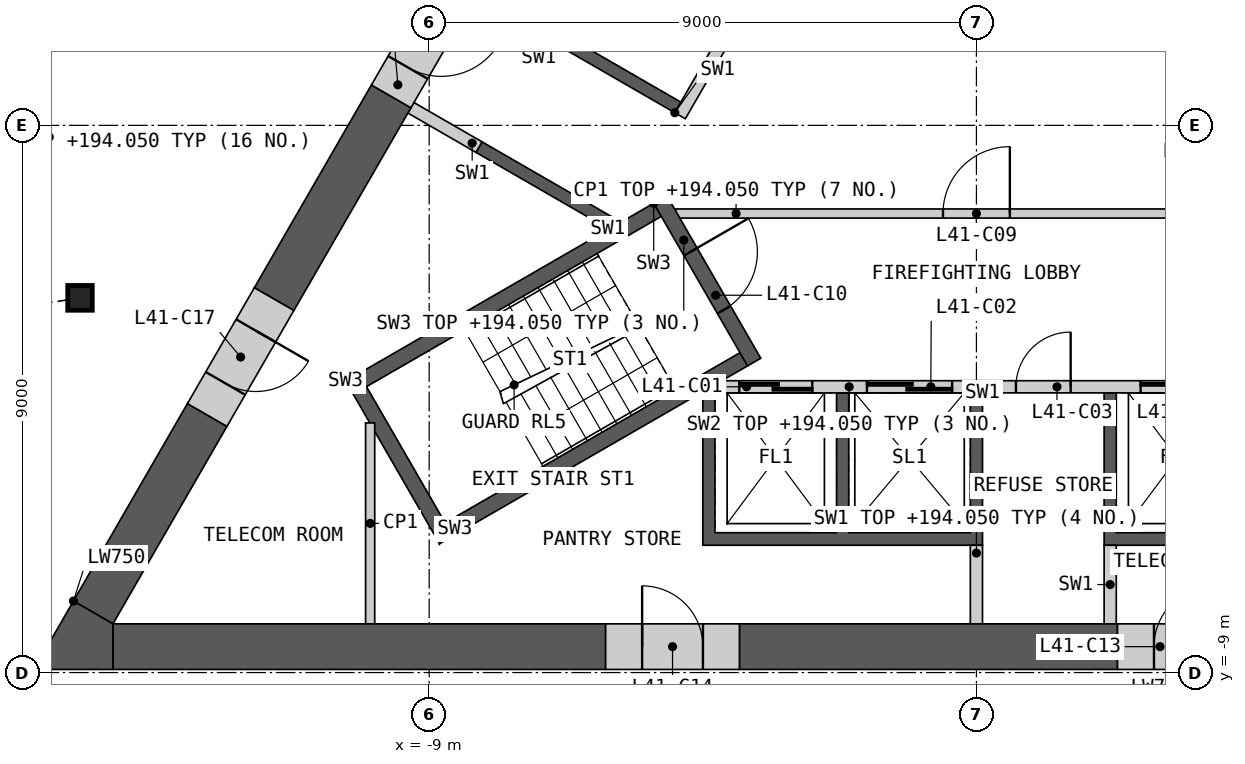
"""IFC4 building model, lengths in metres.
Left out: names, types, materials, properties, quantities, classifications, styles, units other than length and angle.
Written with IfcOpenShell. Run it as: python <this file> out.ifc"""

import sys

from ifc_helpers import new_model, si_unit, direction, frame, frame_2d, origin, origin_2d, place, context, subcontext, project, spatial, polyline, rectangle, i_section, outline, extrude, element, fill, save


model = new_model("IFC4")
c1 = context("Model", 3, precision=1e-05, world=origin(), true_north=direction((0.0, 1.0)))
c2 = subcontext(c1, "Body", "Model", "MODEL_VIEW")
j1 = project(units=[si_unit("LENGTHUNIT", "METRE"), si_unit("PLANEANGLEUNIT", "RADIAN")], contexts=[c1])
p1 = place(None, origin())
s1 = spatial("IfcSite", under=j1, at=p1, CompositionType="ELEMENT")
p2 = place(p1, origin())
s2 = spatial("IfcBuilding", under=s1, at=p2, CompositionType="ELEMENT")
p3 = place(p2, frame((0.0, 0.0, 190.8)))
s3 = spatial("IfcBuildingStorey", under=s2, at=p3, CompositionType="ELEMENT", Elevation=190.8)
p4 = place(p3, frame((-14.743, -2.837, 0.0), z_axis=(0.0, 0.0, 1.0), x_axis=(1.0, 0.0, 0.0)))
e1 = element("IfcColumn", 1, at=p4, inside=s3, PredefinedType="COLUMN", context=c2, shape_type="SweptSolid", body=[
    extrude(i_section(OverallWidth=0.404, OverallDepth=0.407, WebThickness=0.027, FlangeThickness=0.044, at=origin_2d()), origin(), (0.0, 0.0, 1.0), 3.6),
])
p5 = place(p3, origin())
e2 = element("IfcWall", 2, at=p5, inside=s3, PredefinedType="SHEAR", context=c2, shape_type="SweptSolid", body=[
    extrude(outline(polyline([(4.5, -4.4), (4.5, -6.906), (2.1, -6.906), (2.1, -4.4), (2.3, -4.4), (2.3, -6.7), (4.3, -6.7), (4.3, -4.4), (4.5, -4.4)])), origin(), (0.0, 0.0, 1.0), 3.25),
])
p6 = place(p3, origin())
e3 = element("IfcWall", 3, at=p6, inside=s3, PredefinedType="SHEAR", context=c2, shape_type="SweptSolid", body=[
    extrude(outline(polyline([(0.1, -4.4), (0.1, -6.906), (-4.5, -6.906), (-4.5, -4.4), (-4.3, -4.4), (-4.3, -6.7), (-2.3, -6.7), (-2.3, -4.4), (-2.1, -4.4), (-2.1, -6.7), (-0.1, -6.7), (-0.1, -4.4), (0.1, -4.4)])), origin(), (0.0, 0.0, 1.0), 3.25),
])
p7 = place(p3, frame((-4.187, -4.3, 0.0), z_axis=(0.0, 0.0, 1.0), x_axis=(1.0, 0.0, 0.0)))
e4 = element("IfcWall", 4, at=p7, inside=s3, PredefinedType="SOLIDWALL", context=c2, shape_type="SweptSolid", body=[
    extrude(rectangle(XDim=8.373, YDim=0.2, at=frame_2d((4.187, 0.0))), origin(), (0.0, 0.0, 1.0), 3.25),
])
p8 = place(p7, frame((0.287, 0.0, 0.0)))
e5 = element("IfcOpeningElement", 5, at=p8, cuts=e4, PredefinedType="OPENING", context=c2, shape_type="SweptSolid", body=[
    extrude(rectangle(XDim=1.2, YDim=2.1, at=frame_2d((0.6, 1.05))), frame((0.0, 0.11, 0.0), z_axis=(0.0, -1.0, 0.0), x_axis=(1.0, 0.0, 0.0)), (0.0, 0.0, 1.0), 0.22),
])
p9 = place(p7, frame((2.387, 0.0, 0.0)))
e6 = element("IfcOpeningElement", 6, at=p9, cuts=e4, PredefinedType="OPENING", context=c2, shape_type="SweptSolid", body=[
    extrude(rectangle(XDim=1.4, YDim=2.1, at=frame_2d((0.7, 1.05))), frame((0.0, 0.11, 0.0), z_axis=(0.0, -1.0, 0.0), x_axis=(1.0, 0.0, 0.0)), (0.0, 0.0, 1.0), 0.22),
])
p10 = place(p7, frame((4.837, 0.0, 0.0)))
e7 = element("IfcOpeningElement", 7, at=p10, cuts=e4, PredefinedType="OPENING", context=c2, shape_type="SweptSolid", body=[
    extrude(rectangle(XDim=0.9, YDim=2.1, at=frame_2d((0.45, 1.05))), frame((0.0, 0.11, 0.0), z_axis=(0.0, -1.0, 0.0), x_axis=(1.0, 0.0, 0.0)), (0.0, 0.0, 1.0), 0.22),
])
p11 = place(p7, frame((6.887, 0.0, 0.0)))
e8 = element("IfcOpeningElement", 8, at=p11, cuts=e4, PredefinedType="OPENING", context=c2, shape_type="SweptSolid", body=[
    extrude(rectangle(XDim=1.2, YDim=2.1, at=frame_2d((0.6, 1.05))), frame((0.0, 0.11, 0.0), z_axis=(0.0, -1.0, 0.0), x_axis=(1.0, 0.0, 0.0)), (0.0, 0.0, 1.0), 0.22),
])
for number, where, z_axis, x_axis in (
    (9, (0.0, -6.906, 0.0), (0.0, 0.0, 1.0), (0.0, -1.0, 0.0)),
    (10, (2.2, -6.906, 0.0), (0.0, 0.0, 1.0), (0.0, -1.0, 0.0)),
):
    element("IfcWall", number, at=place(p3, frame(where, z_axis=z_axis, x_axis=x_axis)), inside=s3, PredefinedType="SHEAR", context=c2, shape_type="SweptSolid", body=[
        extrude(rectangle(XDim=1.293, YDim=0.2, at=frame_2d((0.646, 0.0))), origin(), (0.0, 0.0, 1.0), 3.25),
    ])
p12 = place(p3, origin())
e11 = element("IfcWall", 11, at=p12, inside=s3, PredefinedType="SHEAR", context=c2, shape_type="SweptSolid", body=[
    extrude(outline(polyline([(1.561, 6.097), (3.731, 7.35), (8.231, -0.444), (6.061, -1.697), (5.96, -1.524), (7.952, -0.374), (4.752, 5.169), (2.76, 4.019), (2.66, 4.192), (4.652, 5.342), (3.652, 7.074), (1.66, 5.924), (1.561, 6.097)])), origin(), (0.0, 0.0, 1.0), 3.25),
])
p13 = place(p3, frame((5.817, -1.476, 0.0), z_axis=(0.0, 0.0, 1.0), x_axis=(-0.500002616675, 0.866023893041, 0.0)))
e12 = element("IfcWall", 12, at=p13, inside=s3, PredefinedType="SOLIDWALL", context=c2, shape_type="SweptSolid", body=[
    extrude(rectangle(XDim=8.373, YDim=0.2, at=frame_2d((4.187, 0.0))), origin(), (0.0, 0.0, 1.0), 3.25),
])
p14 = place(p13, frame((2.637, 0.0, 0.0)))
e13 = element("IfcOpeningElement", 13, at=p14, cuts=e12, PredefinedType="OPENING", context=c2, shape_type="SweptSolid", body=[
    extrude(rectangle(XDim=0.9, YDim=2.1, at=frame_2d((0.45, 1.05))), frame((0.0, 0.11, 0.0), z_axis=(0.0, -1.0, 0.0), x_axis=(1.0, 0.0, 0.0)), (0.0, 0.0, 1.0), 0.22),
])
p15 = place(p13, frame((6.937, 0.0, 0.0)))
e14 = element("IfcOpeningElement", 14, at=p15, cuts=e12, PredefinedType="OPENING", context=c2, shape_type="SweptSolid", body=[
    extrude(rectangle(XDim=1.1, YDim=2.1, at=frame_2d((0.55, 1.05))), frame((0.0, 0.11, 0.0), z_axis=(0.0, -1.0, 0.0), x_axis=(1.0, 0.0, 0.0)), (0.0, 0.0, 1.0), 0.22),
])
p16 = place(p3, origin())
e15 = element("IfcWall", 15, at=p16, inside=s3, PredefinedType="SHEAR", context=c2, shape_type="SweptSolid", body=[
    extrude(outline(polyline([(-6.061, -1.697), (-8.231, -0.444), (-8.131, -0.271), (-5.96, -1.524), (-6.061, -1.697)])), origin(), (0.0, 0.0, 1.0), 3.25),
])
p17 = place(p3, origin())
e16 = element("IfcWall", 16, at=p17, inside=s3, PredefinedType="SHEAR", context=c2, shape_type="SweptSolid", body=[
    extrude(outline(polyline([(-4.96, 0.208), (-7.131, 1.461), (-3.731, 7.35), (-1.561, 6.097), (-1.66, 5.924), (-3.652, 7.074), (-4.652, 5.342), (-2.66, 4.192), (-2.76, 4.019), (-4.752, 5.169), (-5.752, 3.437), (-3.76, 2.287), (-3.861, 2.113), (-5.852, 3.263), (-6.852, 1.531), (-4.861, 0.381), (-4.96, 0.208)])), origin(), (0.0, 0.0, 1.0), 3.25),
])
p18 = place(p3, frame((-1.631, 5.776, 0.0), z_axis=(0.0, 0.0, 1.0), x_axis=(-0.499992876559, -0.866029516466, 0.0)))
e17 = element("IfcWall", 17, at=p18, inside=s3, PredefinedType="SOLIDWALL", context=c2, shape_type="SweptSolid", body=[
    extrude(rectangle(XDim=6.486, YDim=0.2, at=frame_2d((3.243, 0.0))), origin(), (0.0, 0.0, 1.0), 3.25),
])
p19 = place(p18, frame((0.337, 0.0, 0.0)))
e18 = element("IfcOpeningElement", 18, at=p19, cuts=e17, PredefinedType="OPENING", context=c2, shape_type="SweptSolid", body=[
    extrude(rectangle(XDim=1.1, YDim=2.1, at=frame_2d((0.55, 1.05))), frame((0.0, 0.11, 0.0), z_axis=(0.0, -1.0, 0.0), x_axis=(1.0, 0.0, 0.0)), (0.0, 0.0, 1.0), 0.22),
])
p20 = place(p18, frame((2.537, 0.0, 0.0)))
e19 = element("IfcOpeningElement", 19, at=p20, cuts=e17, PredefinedType="OPENING", context=c2, shape_type="SweptSolid", body=[
    extrude(rectangle(XDim=1.1, YDim=2.1, at=frame_2d((0.55, 1.05))), frame((0.0, 0.11, 0.0), z_axis=(0.0, -1.0, 0.0), x_axis=(1.0, 0.0, 0.0)), (0.0, 0.0, 1.0), 0.22),
])
p21 = place(p3, frame((-8.181, -0.357, 0.0), z_axis=(0.0, 0.0, 1.0), x_axis=(-0.866003189247, 0.500038474733, 0.0)))
e20 = element("IfcWall", 20, at=p21, inside=s3, PredefinedType="SHEAR", context=c2, shape_type="SweptSolid", body=[
    extrude(rectangle(XDim=1.293, YDim=0.2, at=frame_2d((0.646, 0.0))), origin(), (0.0, 0.0, 1.0), 3.25),
])
p22 = place(p3, frame((-4.941, -1.45, 0.0), z_axis=(0.0, 0.0, 1.0), x_axis=(1.0, 0.0, 0.0)))
e21 = element("IfcWall", 21, at=p22, inside=s3, PredefinedType="PARTITIONING", context=c2, shape_type="SweptSolid", body=[
    extrude(rectangle(XDim=9.882, YDim=0.15, at=frame_2d((4.941, 0.0))), origin(), (0.0, 0.0, 1.0), 3.25),
])
p23 = place(p22, frame((4.391, 0.0, 0.0)))
e22 = element("IfcOpeningElement", 22, at=p23, cuts=e21, PredefinedType="OPENING", context=c2, shape_type="SweptSolid", body=[
    extrude(rectangle(XDim=1.1, YDim=2.1, at=frame_2d((0.55, 1.05))), frame((0.0, 0.085, 0.0), z_axis=(0.0, -1.0, 0.0), x_axis=(1.0, 0.0, 0.0)), (0.0, 0.0, 1.0), 0.17),
])
p24 = place(p3, origin())
e23 = element("IfcWall", 23, at=p24, inside=s3, PredefinedType="SHEAR", context=c2, shape_type="SweptSolid", body=[
    extrude(outline(polyline([(-5.307, -1.281), (-10.374, -4.206), (-10.032, -4.298), (-5.182, -1.498), (-5.307, -1.281)])), origin(), (0.0, 0.0, 1.0), 3.25),
])
p25 = place(p3, origin())
e24 = element("IfcWall", 24, at=p25, inside=s3, PredefinedType="SHEAR", context=c2, shape_type="SweptSolid", body=[
    extrude(outline(polyline([(-10.374, -4.206), (-8.83, -6.881), (-8.738, -6.539), (-10.032, -4.298), (-10.374, -4.206)])), origin(), (0.0, 0.0, 1.0), 3.25),
])
p26 = place(p3, origin())
e25 = element("IfcWall", 25, at=p26, inside=s3, PredefinedType="SHEAR", context=c2, shape_type="SweptSolid", body=[
    extrude(outline(polyline([(-8.738, -6.539), (-8.83, -6.881), (-3.763, -3.956), (-3.888, -3.739), (-8.738, -6.539)])), origin(), (0.0, 0.0, 1.0), 3.25),
])
p27 = place(p3, frame((-5.199, -1.219, 0.0), z_axis=(0.0, 0.0, 1.0), x_axis=(0.499982516597, -0.866035497597, 0.0)))
e26 = element("IfcWall", 26, at=p27, inside=s3, PredefinedType="SHEAR", context=c2, shape_type="SweptSolid", body=[
    extrude(rectangle(XDim=3.088, YDim=0.25, at=frame_2d((1.544, 0.0))), origin(), (0.0, 0.0, 1.0), 3.25),
])
p28 = place(p27, frame((0.994, 0.0, 0.0)))
e27 = element("IfcOpeningElement", 27, at=p28, cuts=e26, PredefinedType="OPENING", context=c2, shape_type="SweptSolid", body=[
    extrude(rectangle(XDim=1.1, YDim=2.1, at=frame_2d((0.55, 1.05))), frame((0.0, 0.135, 0.0), z_axis=(0.0, -1.0, 0.0), x_axis=(1.0, 0.0, 0.0)), (0.0, 0.0, 1.0), 0.27),
])
p29 = place(p3, frame((-9.971, -8.199, 0.0), z_axis=(0.0, 0.0, 1.0), x_axis=(0.0, 1.0, 0.0)))
e28 = element("IfcWall", 28, at=p29, inside=s3, PredefinedType="PARTITIONING", context=c2, shape_type="SweptSolid", body=[
    extrude(rectangle(XDim=3.305, YDim=0.15, at=frame_2d((1.652, 0.0))), origin(), (0.0, 0.0, 1.0), 3.25),
])
p30 = place(p3, frame((-14.201, -8.574, 0.0), z_axis=(0.0, 0.0, 1.0), x_axis=(1.0, 0.0, 0.0)))
e29 = element("IfcWall", 29, at=p30, inside=s3, PredefinedType="SHEAR", context=c2, shape_type="SweptSolid", body=[
    extrude(rectangle(XDim=8.103, YDim=0.75, at=frame_2d((4.052, 0.0))), origin(), (0.0, 0.0, 1.0), 3.25),
])
p31 = place(p3, frame((-3.898, -8.574, 0.0), z_axis=(0.0, 0.0, 1.0), x_axis=(1.0, 0.0, 0.0)))
e30 = element("IfcWall", 30, at=p31, inside=s3, PredefinedType="SHEAR", context=c2, shape_type="SweptSolid", body=[
    extrude(rectangle(XDim=6.218, YDim=0.75, at=frame_2d((3.109, 0.0))), origin(), (0.0, 0.0, 1.0), 3.25),
])
p32 = place(p3, frame((-9.625, 0.477, 0.0), z_axis=(0.0, 0.0, 1.0), x_axis=(-0.499951145694, -0.866053607994, 0.0)))
e31 = element("IfcWall", 31, at=p32, inside=s3, PredefinedType="SHEAR", context=c2, shape_type="SweptSolid", body=[
    extrude(rectangle(XDim=3.851, YDim=0.75, at=frame_2d((1.925, 0.0))), origin(), (0.0, 0.0, 1.0), 3.25),
])
p33 = place(p3, frame((-12.65, -4.763, 0.0), z_axis=(0.0, 0.0, 1.0), x_axis=(-0.499996681051, -0.866027319972, 0.0)))
e32 = element("IfcWall", 32, at=p33, inside=s3, PredefinedType="SHEAR", context=c2, shape_type="SweptSolid", body=[
    extrude(rectangle(XDim=3.75, YDim=0.75, at=frame_2d((1.875, 0.0))), origin(), (0.0, 0.0, 1.0), 3.25),
])
p34 = place(p3, origin())
e33 = element("IfcWall", 33, at=p34, inside=s3, PredefinedType="SHEAR", context=c2, shape_type="SweptSolid", body=[
    extrude(outline(polyline([(-14.851, -7.824), (-14.201, -8.199), (-14.201, -8.949), (-15.5, -8.949), (-14.851, -7.824)])), origin(), (0.0, 0.0, 1.0), 3.25),
])
p35 = place(p3, frame((2.32, -8.574, 0.0), z_axis=(0.0, 0.0, 1.0), x_axis=(1.0, 0.0, 0.0)))
e34 = element("IfcWall", 34, at=p35, inside=s3, PredefinedType="SHEAR", context=c2, shape_type="SweptSolid", body=[
    extrude(rectangle(XDim=2.625, YDim=0.75, at=frame_2d((1.312, 0.0))), origin(), (0.0, 0.0, 1.0), 3.25),
])
p36 = place(p35, frame((0.6, 0.0, 0.0)))
e35 = element("IfcOpeningElement", 35, at=p36, cuts=e34, PredefinedType="OPENING", context=c2, shape_type="SweptSolid", body=[
    extrude(rectangle(XDim=1.0, YDim=2.1, at=frame_2d((0.5, 1.05))), frame((0.0, 0.385, 0.0), z_axis=(0.0, -1.0, 0.0), x_axis=(1.0, 0.0, 0.0)), (0.0, 0.0, 1.0), 0.77),
])
p37 = place(p3, frame((-6.098, -8.574, 0.0), z_axis=(0.0, 0.0, 1.0), x_axis=(1.0, 0.0, 0.0)))
e36 = element("IfcWall", 36, at=p37, inside=s3, PredefinedType="SHEAR", context=c2, shape_type="SweptSolid", body=[
    extrude(rectangle(XDim=2.2, YDim=0.75, at=frame_2d((1.1, 0.0))), origin(), (0.0, 0.0, 1.0), 3.25),
])
p38 = place(p37, frame((0.6, 0.0, 0.0)))
e37 = element("IfcOpeningElement", 37, at=p38, cuts=e36, PredefinedType="OPENING", context=c2, shape_type="SweptSolid", body=[
    extrude(rectangle(XDim=1.0, YDim=2.1, at=frame_2d((0.5, 1.05))), frame((0.0, 0.385, 0.0), z_axis=(0.0, -1.0, 0.0), x_axis=(1.0, 0.0, 0.0)), (0.0, 0.0, 1.0), 0.77),
])
p39 = place(p3, frame((-11.551, -2.858, 0.0), z_axis=(0.0, 0.0, 1.0), x_axis=(-0.499946605688, -0.86605622881, 0.0)))
e38 = element("IfcWall", 38, at=p39, inside=s3, PredefinedType="SHEAR", context=c2, shape_type="SweptSolid", body=[
    extrude(rectangle(XDim=2.2, YDim=0.75, at=frame_2d((1.1, 0.0))), origin(), (0.0, 0.0, 1.0), 3.25),
])
p40 = place(p39, frame((0.6, 0.0, 0.0)))
e39 = element("IfcOpeningElement", 39, at=p40, cuts=e38, PredefinedType="OPENING", context=c2, shape_type="SweptSolid", body=[
    extrude(rectangle(XDim=1.0, YDim=2.1, at=frame_2d((0.5, 1.05))), frame((0.0, 0.385, 0.0), z_axis=(0.0, -1.0, 0.0), x_axis=(1.0, 0.0, 0.0)), (0.0, 0.0, 1.0), 0.77),
])
p41 = place(p3, frame((-8.525, 2.382, 0.0), z_axis=(0.0, 0.0, 1.0), x_axis=(-0.500077893725, -0.86598042715, 0.0)))
e40 = element("IfcWall", 40, at=p41, inside=s3, PredefinedType="SHEAR", context=c2, shape_type="SweptSolid", body=[
    extrude(rectangle(XDim=2.2, YDim=0.75, at=frame_2d((1.1, 0.0))), origin(), (0.0, 0.0, 1.0), 3.25),
])
p42 = place(p41, frame((0.55, 0.0, 0.0)))
e41 = element("IfcOpeningElement", 41, at=p42, cuts=e40, PredefinedType="OPENING", context=c2, shape_type="SweptSolid", body=[
    extrude(rectangle(XDim=1.1, YDim=2.1, at=frame_2d((0.55, 1.05))), frame((0.0, 0.385, 0.0), z_axis=(0.0, -1.0, 0.0), x_axis=(1.0, 0.0, 0.0)), (0.0, 0.0, 1.0), 0.77),
])
p43 = place(p3, frame((-19.476, -5.035, 0.0), z_axis=(0.0, 0.0, 1.0), x_axis=(0.500000757641, 0.86602496636, 0.0)))
e42 = element("IfcWall", 42, at=p43, inside=s3, PredefinedType="PARTITIONING", context=c2, shape_type="SweptSolid", body=[
    extrude(rectangle(XDim=28.198, YDim=0.2, at=frame_2d((14.099, 0.0))), origin(), (0.0, 0.0, 1.0), 3.25),
])
p44 = place(p43, frame((25.796, 0.0, 0.0)))
e43 = element("IfcOpeningElement", 43, at=p44, cuts=e42, PredefinedType="OPENING", context=c2, shape_type="SweptSolid", body=[
    extrude(rectangle(XDim=0.95, YDim=2.1, at=frame_2d((0.475, 1.05))), frame((0.0, 0.11, 0.0), z_axis=(0.0, -1.0, 0.0), x_axis=(1.0, 0.0, 0.0)), (0.0, 0.0, 1.0), 0.22),
])
p45 = place(p43, frame((14.603, 0.0, 0.0)))
e44 = element("IfcOpeningElement", 44, at=p45, cuts=e42, PredefinedType="OPENING", context=c2, shape_type="SweptSolid", body=[
    extrude(rectangle(XDim=1.1, YDim=2.1, at=frame_2d((0.55, 1.05))), frame((0.0, 0.11, 0.0), z_axis=(0.0, -1.0, 0.0), x_axis=(1.0, 0.0, 0.0)), (0.0, 0.0, 1.0), 0.22),
])
p46 = place(p43, frame((11.993, 0.0, 0.0)))
e45 = element("IfcOpeningElement", 45, at=p46, cuts=e42, PredefinedType="OPENING", context=c2, shape_type="SweptSolid", body=[
    extrude(rectangle(XDim=1.1, YDim=2.1, at=frame_2d((0.55, 1.05))), frame((0.0, 0.11, 0.0), z_axis=(0.0, -1.0, 0.0), x_axis=(1.0, 0.0, 0.0)), (0.0, 0.0, 1.0), 0.22),
])
p47 = place(p43, frame((1.452, 0.0, 0.0)))
e46 = element("IfcOpeningElement", 46, at=p47, cuts=e42, PredefinedType="OPENING", context=c2, shape_type="SweptSolid", body=[
    extrude(rectangle(XDim=0.95, YDim=2.1, at=frame_2d((0.475, 1.05))), frame((0.0, 0.11, 0.0), z_axis=(0.0, -1.0, 0.0), x_axis=(1.0, 0.0, 0.0)), (0.0, 0.0, 1.0), 0.22),
])
p48 = place(p8, origin())
e47 = element("IfcDoor", 47, at=p48, inside=s3, OperationType="SLIDING_TO_LEFT", PredefinedType="DOOR", context=c2, shape_type="SweptSolid", body=[
    extrude(rectangle(XDim=1.2, YDim=2.1, at=frame_2d((0.6, 1.05))), frame((0.0, 0.025, 0.0), z_axis=(0.0, -1.0, 0.0), x_axis=(1.0, 0.0, 0.0)), (0.0, 0.0, 1.0), 0.05),
])
fill(e5, e47)
p49 = place(p9, origin())
e48 = element("IfcDoor", 48, at=p49, inside=s3, OperationType="SLIDING_TO_LEFT", PredefinedType="DOOR", context=c2, shape_type="SweptSolid", body=[
    extrude(rectangle(XDim=1.4, YDim=2.1, at=frame_2d((0.7, 1.05))), frame((0.0, 0.025, 0.0), z_axis=(0.0, -1.0, 0.0), x_axis=(1.0, 0.0, 0.0)), (0.0, 0.0, 1.0), 0.05),
])
fill(e6, e48)
p50 = place(p10, origin())
e49 = element("IfcDoor", 49, at=p50, inside=s3, OperationType="SINGLE_SWING_RIGHT", PredefinedType="DOOR", context=c2, shape_type="SweptSolid", body=[
    extrude(rectangle(XDim=0.9, YDim=2.1, at=frame_2d((0.45, 1.05))), frame((0.0, 0.025, 0.0), z_axis=(0.0, -1.0, 0.0), x_axis=(1.0, 0.0, 0.0)), (0.0, 0.0, 1.0), 0.05),
])
fill(e7, e49)
p51 = place(p11, origin())
e50 = element("IfcDoor", 50, at=p51, inside=s3, OperationType="SLIDING_TO_LEFT", PredefinedType="DOOR", context=c2, shape_type="SweptSolid", body=[
    extrude(rectangle(XDim=1.2, YDim=2.1, at=frame_2d((0.6, 1.05))), frame((0.0, 0.025, 0.0), z_axis=(0.0, -1.0, 0.0), x_axis=(1.0, 0.0, 0.0)), (0.0, 0.0, 1.0), 0.05),
])
fill(e8, e50)
p52 = place(p23, origin())
e51 = element("IfcDoor", 51, at=p52, inside=s3, OperationType="SINGLE_SWING_RIGHT", PredefinedType="DOOR", context=c2, shape_type="SweptSolid", body=[
    extrude(rectangle(XDim=1.1, YDim=2.1, at=frame_2d((0.55, 1.05))), frame((0.0, 0.025, 0.0), z_axis=(0.0, -1.0, 0.0), x_axis=(1.0, 0.0, 0.0)), (0.0, 0.0, 1.0), 0.05),
])
fill(e22, e51)
p53 = place(p28, origin())
e52 = element("IfcDoor", 52, at=p53, inside=s3, OperationType="SINGLE_SWING_LEFT", PredefinedType="DOOR", context=c2, shape_type="SweptSolid", body=[
    extrude(rectangle(XDim=1.1, YDim=2.1, at=frame_2d((0.55, 1.05))), frame((0.0, 0.025, 0.0), z_axis=(0.0, -1.0, 0.0), x_axis=(1.0, 0.0, 0.0)), (0.0, 0.0, 1.0), 0.05),
])
fill(e27, e52)
p54 = place(p36, origin())
e53 = element("IfcDoor", 53, at=p54, inside=s3, OperationType="SINGLE_SWING_RIGHT", PredefinedType="DOOR", context=c2, shape_type="SweptSolid", body=[
    extrude(rectangle(XDim=1.0, YDim=2.1, at=frame_2d((0.5, 1.05))), frame((0.0, 0.13, 0.0), z_axis=(0.0, -1.0, 0.0), x_axis=(1.0, 0.0, 0.0)), (0.0, 0.0, 1.0), 0.05),
])
fill(e35, e53)
p55 = place(p38, origin())
e54 = element("IfcDoor", 54, at=p55, inside=s3, OperationType="SINGLE_SWING_LEFT", PredefinedType="DOOR", context=c2, shape_type="SweptSolid", body=[
    extrude(rectangle(XDim=1.0, YDim=2.1, at=frame_2d((0.5, 1.05))), frame((0.0, 0.13, 0.0), z_axis=(0.0, -1.0, 0.0), x_axis=(1.0, 0.0, 0.0)), (0.0, 0.0, 1.0), 0.05),
])
fill(e37, e54)
p56 = place(p40, origin())
e55 = element("IfcDoor", 55, at=p56, inside=s3, OperationType="SINGLE_SWING_LEFT", PredefinedType="DOOR", context=c2, shape_type="SweptSolid", body=[
    extrude(rectangle(XDim=1.0, YDim=2.1, at=frame_2d((0.5, 1.05))), frame((0.0, 0.13, 0.0), z_axis=(0.0, -1.0, 0.0), x_axis=(1.0, 0.0, 0.0)), (0.0, 0.0, 1.0), 0.05),
])
fill(e39, e55)
p57 = place(p42, origin())
e56 = element("IfcDoor", 56, at=p57, inside=s3, OperationType="SINGLE_SWING_LEFT", PredefinedType="DOOR", context=c2, shape_type="SweptSolid", body=[
    extrude(rectangle(XDim=1.1, YDim=2.1, at=frame_2d((0.55, 1.05))), frame((0.0, 0.13, 0.0), z_axis=(0.0, -1.0, 0.0), x_axis=(1.0, 0.0, 0.0)), (0.0, 0.0, 1.0), 0.05),
])
fill(e41, e56)
save(model, sys.argv[1])
